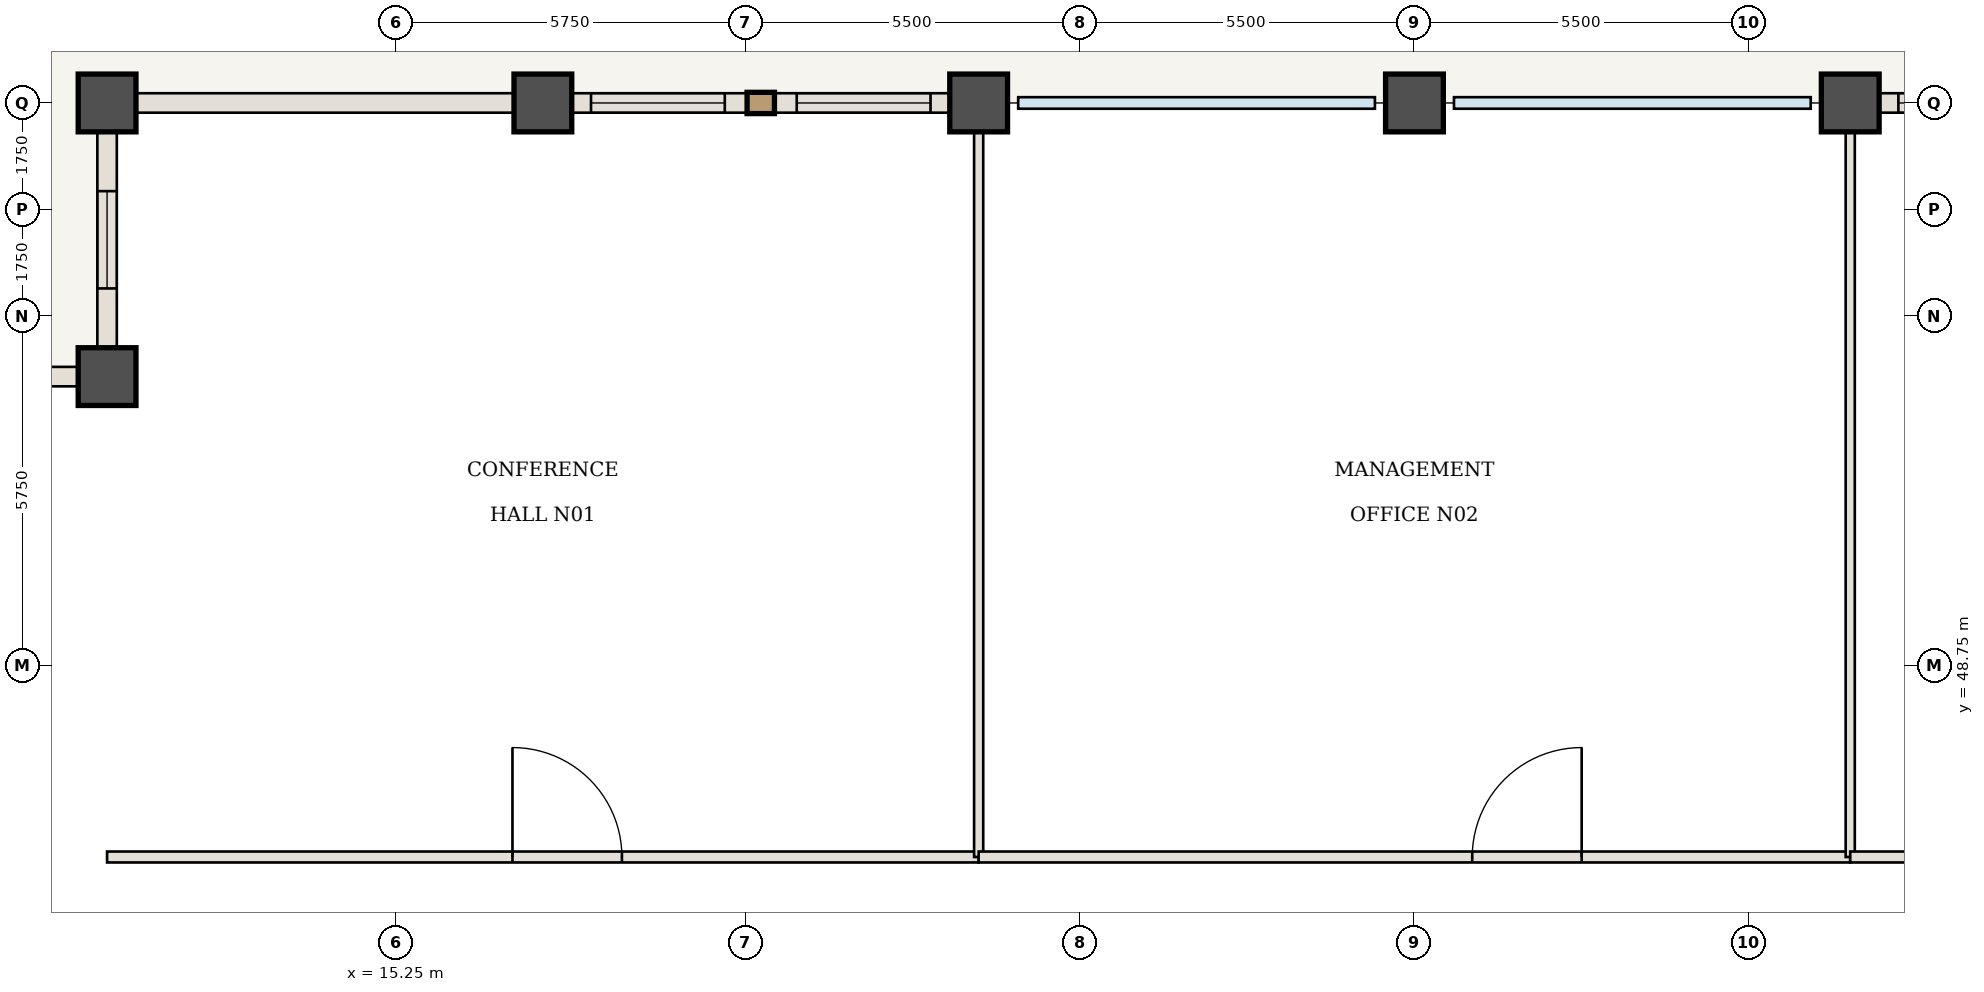
"""IFC4 building model, lengths in metres.
Left out: names, types, materials, properties, quantities, classifications, styles, units other than length and angle.
Written with IfcOpenShell. Run it as: python <this file> out.ifc"""

import sys

from ifc_helpers import new_model, si_unit, direction, frame, frame_2d, origin, origin_2d, place, context, subcontext, project, spatial, rectangle, extrude, element, fill, save


model = new_model("IFC4")
c1 = context("Model", 3, precision=1e-05, world=origin(), true_north=direction((0.0, 1.0)))
c2 = subcontext(c1, "Body", "Model", "MODEL_VIEW")
j1 = project(units=[si_unit("LENGTHUNIT", "METRE"), si_unit("PLANEANGLEUNIT", "RADIAN")], contexts=[c1])
p1 = place(None, origin())
s1 = spatial("IfcSite", under=j1, at=p1, CompositionType="ELEMENT")
p2 = place(p1, origin())
s2 = spatial("IfcBuilding", under=s1, at=p2, CompositionType="ELEMENT")
p3 = place(p2, frame((0.0, 0.0, 106.05)))
s3 = spatial("IfcBuildingStorey", under=s2, at=p3, CompositionType="ELEMENT", Elevation=106.05)
for number, where, z_axis, x_axis in (
    (1, (10.5, 58.0, -0.42), (0.0, 0.0, 1.0), (1.0, 0.0, 0.0)),
    (2, (10.5, 53.5, -0.42), (0.0, 0.0, 1.0), (1.0, 0.0, 0.0)),
    (3, (17.667, 58.0, -0.42), (0.0, 0.0, 1.0), (1.0, 0.0, 0.0)),
    (4, (24.833, 58.0, -0.42), (0.0, 0.0, 1.0), (1.0, 0.0, 0.0)),
    (5, (32.0, 58.0, -0.42), (0.0, 0.0, 1.0), (1.0, 0.0, 0.0)),
    (6, (39.167, 58.0, -0.42), (0.0, 0.0, 1.0), (1.0, 0.0, 0.0)),
):
    element("IfcColumn", number, at=place(p3, frame(where, z_axis=z_axis, x_axis=x_axis)), inside=s3, PredefinedType="COLUMN", context=c2, shape_type="SweptSolid", body=[
        extrude(rectangle(XDim=0.95, YDim=0.95, at=origin_2d()), origin(), (0.0, 0.0, 1.0), 4.97),
    ])
p4 = place(p3, frame((10.5, 45.6, 0.0), z_axis=(0.0, 0.0, 1.0), x_axis=(1.0, 0.0, 0.0)))
e7 = element("IfcWall", 7, at=p4, inside=s3, PredefinedType="STANDARD", context=c2, shape_type="SweptSolid", body=[
    extrude(rectangle(XDim=14.333, YDim=0.18, at=frame_2d((7.167, 0.0))), origin(), (0.0, 0.0, 1.0), 4.13),
])
p5 = place(p4, frame((6.667, 0.0, 0.0)))
e8 = element("IfcOpeningElement", 8, at=p5, cuts=e7, PredefinedType="OPENING", context=c2, shape_type="SweptSolid", body=[
    extrude(rectangle(XDim=1.8, YDim=2.35, at=frame_2d((0.9, 1.175))), frame((0.0, 0.1, 0.0), z_axis=(0.0, -1.0, 0.0), x_axis=(1.0, 0.0, 0.0)), (0.0, 0.0, 1.0), 0.2),
])
p6 = place(p3, frame((24.833, 45.6, 0.0), z_axis=(0.0, 0.0, 1.0), x_axis=(0.0, 1.0, 0.0)))
e9 = element("IfcWall", 9, at=p6, inside=s3, PredefinedType="STANDARD", context=c2, shape_type="SweptSolid", body=[
    extrude(rectangle(XDim=12.34, YDim=0.15, at=frame_2d((6.17, 0.0))), origin(), (0.0, 0.0, 1.0), 4.13),
])
p7 = place(p3, frame((24.833, 45.6, 0.0), z_axis=(0.0, 0.0, 1.0), x_axis=(1.0, 0.0, 0.0)))
e10 = element("IfcWall", 10, at=p7, inside=s3, PredefinedType="STANDARD", context=c2, shape_type="SweptSolid", body=[
    extrude(rectangle(XDim=14.333, YDim=0.18, at=frame_2d((7.167, 0.0))), origin(), (0.0, 0.0, 1.0), 4.13),
])
p8 = place(p7, frame((8.117, 0.0, 0.0)))
e11 = element("IfcOpeningElement", 11, at=p8, cuts=e10, PredefinedType="OPENING", context=c2, shape_type="SweptSolid", body=[
    extrude(rectangle(XDim=1.8, YDim=2.35, at=frame_2d((0.9, 1.175))), frame((0.0, 0.1, 0.0), z_axis=(0.0, -1.0, 0.0), x_axis=(1.0, 0.0, 0.0)), (0.0, 0.0, 1.0), 0.2),
])
p9 = place(p3, frame((39.167, 45.6, 0.0), z_axis=(0.0, 0.0, 1.0), x_axis=(0.0, 1.0, 0.0)))
e12 = element("IfcWall", 12, at=p9, inside=s3, PredefinedType="STANDARD", context=c2, shape_type="SweptSolid", body=[
    extrude(rectangle(XDim=12.34, YDim=0.15, at=frame_2d((6.17, 0.0))), origin(), (0.0, 0.0, 1.0), 4.13),
])
p10 = place(p3, frame((39.167, 45.6, 0.0), z_axis=(0.0, 0.0, 1.0), x_axis=(1.0, 0.0, 0.0)))
e13 = element("IfcWall", 13, at=p10, inside=s3, PredefinedType="STANDARD", context=c2, shape_type="SweptSolid", body=[
    extrude(rectangle(XDim=14.333, YDim=0.18, at=frame_2d((7.167, 0.0))), origin(), (0.0, 0.0, 1.0), 4.13),
])
p11 = place(p10, frame((6.667, 0.0, 0.0)))
e14 = element("IfcOpeningElement", 14, at=p11, cuts=e13, PredefinedType="OPENING", context=c2, shape_type="SweptSolid", body=[
    extrude(rectangle(XDim=1.8, YDim=2.35, at=frame_2d((0.9, 1.175))), frame((0.0, 0.1, 0.0), z_axis=(0.0, -1.0, 0.0), x_axis=(1.0, 0.0, 0.0)), (0.0, 0.0, 1.0), 0.2),
])
p12 = place(p3, frame((10.5, 58.0, 0.0), z_axis=(0.0, 0.0, 1.0), x_axis=(1.0, 0.0, 0.0)))
e15 = element("IfcWall", 15, at=p12, inside=s3, PredefinedType="USERDEFINED", context=c2, shape_type="SweptSolid", body=[
    extrude(rectangle(XDim=7.167, YDim=0.32, at=frame_2d((3.583, 0.0))), origin(), (0.0, 0.0, 1.0), 3.33),
])
p13 = place(p3, frame((17.667, 58.0, 0.0), z_axis=(0.0, 0.0, 1.0), x_axis=(1.0, 0.0, 0.0)))
e16 = element("IfcWall", 16, at=p13, inside=s3, PredefinedType="USERDEFINED", context=c2, shape_type="SweptSolid", body=[
    extrude(rectangle(XDim=7.167, YDim=0.32, at=frame_2d((3.583, 0.0))), origin(), (0.0, 0.0, 1.0), 3.33),
])
p14 = place(p13, frame((0.792, 0.0, 0.85)))
e17 = element("IfcOpeningElement", 17, at=p14, cuts=e16, PredefinedType="OPENING", context=c2, shape_type="SweptSolid", body=[
    extrude(rectangle(XDim=2.2, YDim=2.2, at=frame_2d((1.1, 1.1))), frame((0.0, 0.17, 0.0), z_axis=(0.0, -1.0, 0.0), x_axis=(1.0, 0.0, 0.0)), (0.0, 0.0, 1.0), 0.34),
])
p15 = place(p13, frame((4.175, 0.0, 0.85)))
e18 = element("IfcOpeningElement", 18, at=p15, cuts=e16, PredefinedType="OPENING", context=c2, shape_type="SweptSolid", body=[
    extrude(rectangle(XDim=2.2, YDim=2.2, at=frame_2d((1.1, 1.1))), frame((0.0, 0.17, 0.0), z_axis=(0.0, -1.0, 0.0), x_axis=(1.0, 0.0, 0.0)), (0.0, 0.0, 1.0), 0.34),
])
p16 = place(p3, frame((39.167, 58.0, 0.0), z_axis=(0.0, 0.0, 1.0), x_axis=(1.0, 0.0, 0.0)))
e19 = element("IfcWall", 19, at=p16, inside=s3, PredefinedType="USERDEFINED", context=c2, shape_type="SweptSolid", body=[
    extrude(rectangle(XDim=7.167, YDim=0.32, at=frame_2d((3.583, 0.0))), origin(), (0.0, 0.0, 1.0), 3.33),
])
p17 = place(p16, frame((0.792, 0.0, 0.85)))
e20 = element("IfcOpeningElement", 20, at=p17, cuts=e19, PredefinedType="OPENING", context=c2, shape_type="SweptSolid", body=[
    extrude(rectangle(XDim=2.2, YDim=2.2, at=frame_2d((1.1, 1.1))), frame((0.0, 0.17, 0.0), z_axis=(0.0, -1.0, 0.0), x_axis=(1.0, 0.0, 0.0)), (0.0, 0.0, 1.0), 0.34),
])
p18 = place(p16, frame((4.175, 0.0, 0.85)))
e21 = element("IfcOpeningElement", 21, at=p18, cuts=e19, PredefinedType="OPENING", context=c2, shape_type="SweptSolid", body=[
    extrude(rectangle(XDim=2.2, YDim=2.2, at=frame_2d((1.1, 1.1))), frame((0.0, 0.17, 0.0), z_axis=(0.0, -1.0, 0.0), x_axis=(1.0, 0.0, 0.0)), (0.0, 0.0, 1.0), 0.34),
])
p19 = place(p3, frame((10.5, 53.5, 0.0), z_axis=(0.0, 0.0, 1.0), x_axis=(0.0, 1.0, 0.0)))
e22 = element("IfcWall", 22, at=p19, inside=s3, PredefinedType="USERDEFINED", context=c2, shape_type="SweptSolid", body=[
    extrude(rectangle(XDim=4.5, YDim=0.32, at=frame_2d((2.25, 0.0))), origin(), (0.0, 0.0, 1.0), 3.33),
])
p20 = place(p19, frame((1.45, 0.0, 0.85)))
e23 = element("IfcOpeningElement", 23, at=p20, cuts=e22, PredefinedType="OPENING", context=c2, shape_type="SweptSolid", body=[
    extrude(rectangle(XDim=1.6, YDim=2.05, at=frame_2d((0.8, 1.025))), frame((0.0, 0.17, 0.0), z_axis=(0.0, -1.0, 0.0), x_axis=(1.0, 0.0, 0.0)), (0.0, 0.0, 1.0), 0.34),
])
p21 = place(p3, frame((6.0, 53.5, 0.0), z_axis=(0.0, 0.0, 1.0), x_axis=(1.0, 0.0, 0.0)))
e24 = element("IfcWall", 24, at=p21, inside=s3, PredefinedType="USERDEFINED", context=c2, shape_type="SweptSolid", body=[
    extrude(rectangle(XDim=4.5, YDim=0.32, at=frame_2d((2.25, 0.0))), origin(), (0.0, 0.0, 1.0), 3.33),
])
p22 = place(p21, frame((1.45, 0.0, 0.85)))
e25 = element("IfcOpeningElement", 25, at=p22, cuts=e24, PredefinedType="OPENING", context=c2, shape_type="SweptSolid", body=[
    extrude(rectangle(XDim=1.6, YDim=2.05, at=frame_2d((0.8, 1.025))), frame((0.0, 0.17, 0.0), z_axis=(0.0, -1.0, 0.0), x_axis=(1.0, 0.0, 0.0)), (0.0, 0.0, 1.0), 0.34),
])
p23 = place(p5, origin())
e26 = element("IfcDoor", 26, at=p23, inside=s3, OperationType="SINGLE_SWING_LEFT", PredefinedType="DOOR", context=c2, shape_type="SweptSolid", body=[
    extrude(rectangle(XDim=1.8, YDim=2.35, at=frame_2d((0.9, 1.175))), frame((0.0, 0.025, 0.0), z_axis=(0.0, -1.0, 0.0), x_axis=(1.0, 0.0, 0.0)), (0.0, 0.0, 1.0), 0.05),
])
fill(e8, e26)
p24 = place(p8, origin())
e27 = element("IfcDoor", 27, at=p24, inside=s3, OperationType="SINGLE_SWING_RIGHT", PredefinedType="DOOR", context=c2, shape_type="SweptSolid", body=[
    extrude(rectangle(XDim=1.8, YDim=2.35, at=frame_2d((0.9, 1.175))), frame((0.0, 0.025, 0.0), z_axis=(0.0, -1.0, 0.0), x_axis=(1.0, 0.0, 0.0)), (0.0, 0.0, 1.0), 0.05),
])
fill(e11, e27)
p25 = place(p14, origin())
e28 = element("IfcWindow", 28, at=p25, inside=s3, PartitioningType="SINGLE_PANEL", PredefinedType="WINDOW", context=c2, shape_type="SweptSolid", body=[
    extrude(rectangle(XDim=2.2, YDim=2.2, at=frame_2d((1.1, 1.1))), frame((0.0, 0.03, 0.0), z_axis=(0.0, -1.0, 0.0), x_axis=(1.0, 0.0, 0.0)), (0.0, 0.0, 1.0), 0.06),
])
fill(e17, e28)
p26 = place(p15, origin())
e29 = element("IfcWindow", 29, at=p26, inside=s3, PartitioningType="SINGLE_PANEL", PredefinedType="WINDOW", context=c2, shape_type="SweptSolid", body=[
    extrude(rectangle(XDim=2.2, YDim=2.2, at=frame_2d((1.1, 1.1))), frame((0.0, 0.03, 0.0), z_axis=(0.0, -1.0, 0.0), x_axis=(1.0, 0.0, 0.0)), (0.0, 0.0, 1.0), 0.06),
])
fill(e18, e29)
p27 = place(p17, origin())
e30 = element("IfcWindow", 30, at=p27, inside=s3, PartitioningType="SINGLE_PANEL", PredefinedType="WINDOW", context=c2, shape_type="SweptSolid", body=[
    extrude(rectangle(XDim=2.2, YDim=2.2, at=frame_2d((1.1, 1.1))), frame((0.0, 0.03, 0.0), z_axis=(0.0, -1.0, 0.0), x_axis=(1.0, 0.0, 0.0)), (0.0, 0.0, 1.0), 0.06),
])
fill(e20, e30)
p28 = place(p20, origin())
e31 = element("IfcWindow", 31, at=p28, inside=s3, PartitioningType="SINGLE_PANEL", PredefinedType="WINDOW", context=c2, shape_type="SweptSolid", body=[
    extrude(rectangle(XDim=1.6, YDim=2.05, at=frame_2d((0.8, 1.025))), frame((0.0, 0.03, 0.0), z_axis=(0.0, -1.0, 0.0), x_axis=(1.0, 0.0, 0.0)), (0.0, 0.0, 1.0), 0.06),
])
fill(e23, e31)
save(model, sys.argv[1])
